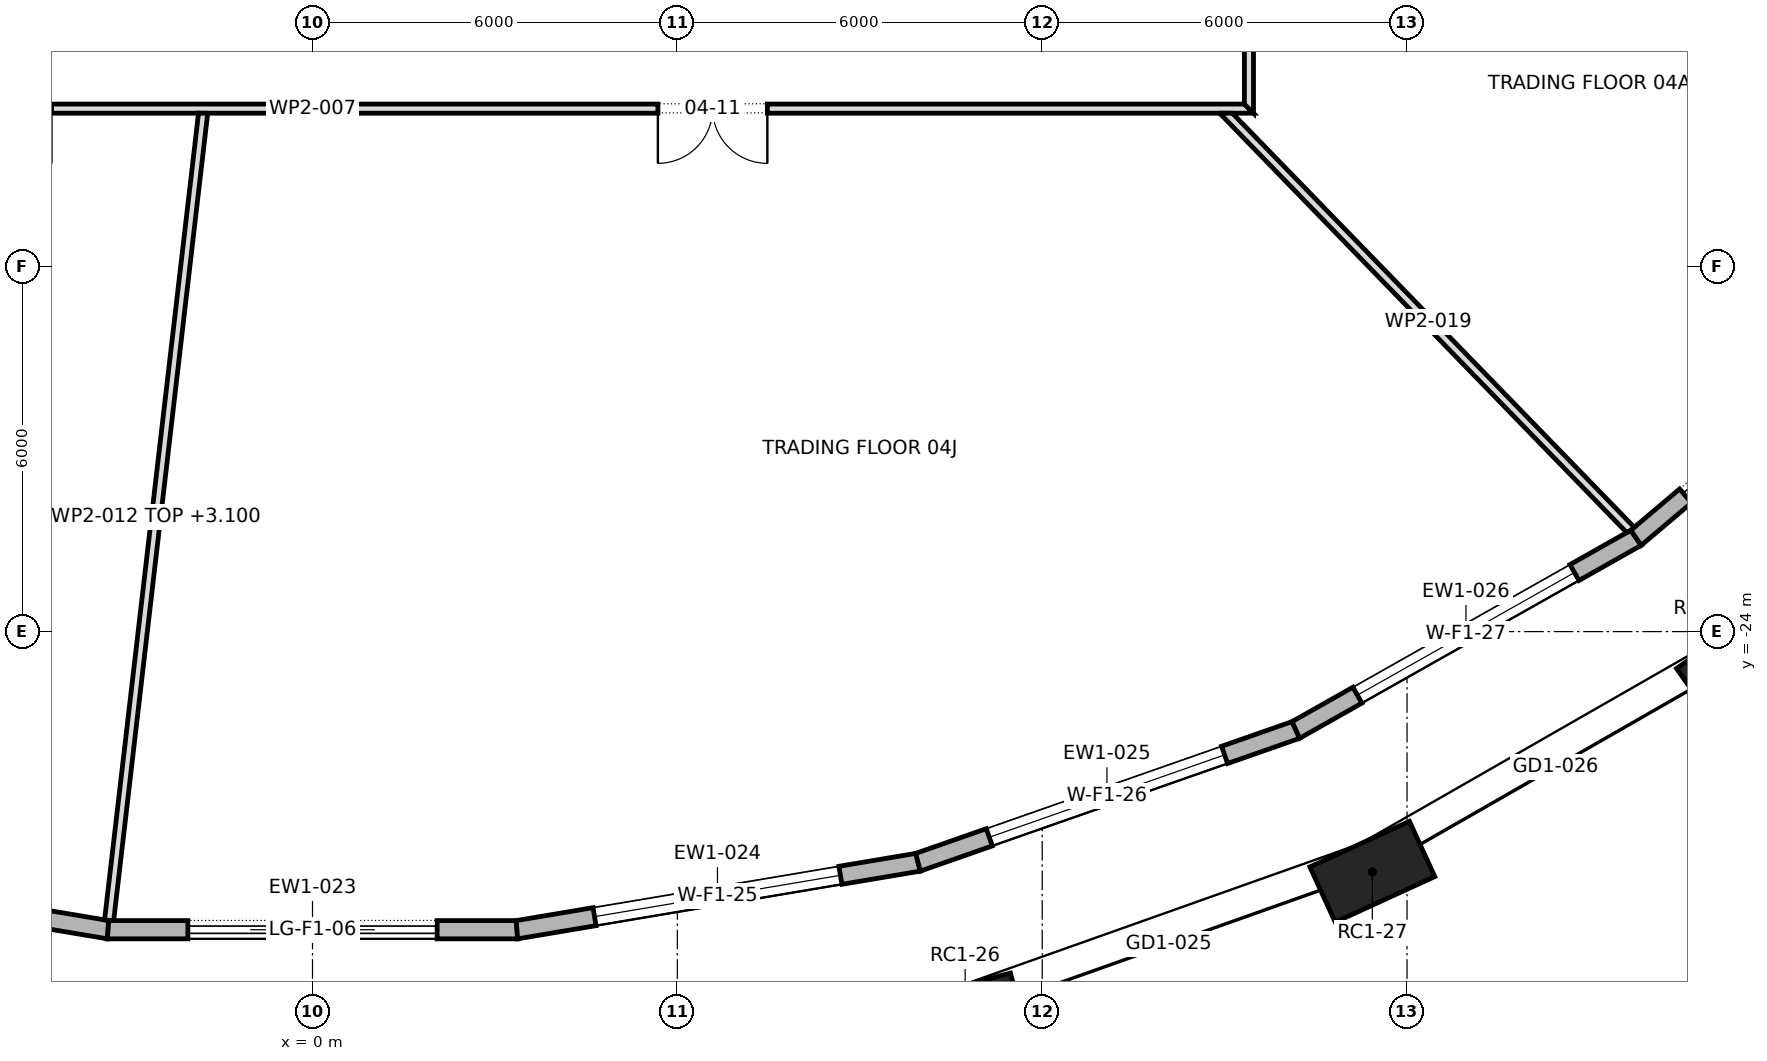
"""IFC4 building model, lengths in metres.
Left out: names, types, materials, properties, quantities, classifications, styles, units other than length and angle.
Written with IfcOpenShell. Run it as: python <this file> out.ifc"""

import sys

from ifc_helpers import new_model, si_unit, direction, frame, frame_2d, origin, origin_2d, place, context, subcontext, project, spatial, polyline, rectangle, outline, extrude, element, fill, save


model = new_model("IFC4")
c1 = context("Model", 3, precision=1e-05, world=origin(), true_north=direction((0.0, 1.0)))
c2 = subcontext(c1, "Body", "Model", "MODEL_VIEW")
j1 = project(units=[si_unit("LENGTHUNIT", "METRE"), si_unit("PLANEANGLEUNIT", "RADIAN")], contexts=[c1])
p1 = place(None, origin())
s1 = spatial("IfcSite", under=j1, at=p1, CompositionType="ELEMENT")
p2 = place(p1, origin())
s2 = spatial("IfcBuilding", under=s1, at=p2, CompositionType="ELEMENT")
p3 = place(p2, frame((0.0, 0.0, 61.3)))
s3 = spatial("IfcBuildingStorey", under=s2, at=p3, CompositionType="ELEMENT", Elevation=61.3)
for number, where, z_axis, x_axis in (
    (1, (10.733, -30.327, 0.0), (0.0, 0.0, 1.0), (0.968, 0.252, 0.0)),
    (2, (17.429, -27.95, 0.0), (0.0, 0.0, 1.0), (0.909, 0.417, 0.0)),
    (3, (23.456, -24.498, 0.0), (0.0, 0.0, 1.0), (0.818, 0.575, 0.0)),
):
    element("IfcColumn", number, at=place(p3, frame(where, z_axis=z_axis, x_axis=x_axis)), inside=s3, PredefinedType="COLUMN", context=c2, shape_type="SweptSolid", body=[
        extrude(rectangle(XDim=1.8, YDim=1.0, at=origin_2d()), origin(), (0.0, 0.0, 1.0), 4.2),
    ])
p4 = place(p3, frame((-9.958, -27.793, 0.0), z_axis=(0.0, 0.0, 1.0), x_axis=(0.986153133093, -0.165837263877, 0.0)))
e4 = element("IfcWall", 4, at=p4, inside=s3, PredefinedType="STANDARD", context=c2, shape_type="SweptSolid", body=[
    extrude(outline(polyline([(-0.013, -0.15), (6.7, -0.15), (6.676, 0.15), (0.013, 0.15), (-0.013, -0.15)])), origin(), (0.0, 0.0, 1.0), 3.9),
])
p5 = place(p4, frame((1.294, 0.0, 0.6)))
e5 = element("IfcOpeningElement", 5, at=p5, cuts=e4, PredefinedType="OPENING", context=c2, shape_type="SweptSolid", body=[
    extrude(rectangle(XDim=4.1, YDim=2.85, at=frame_2d((2.05, 1.425))), frame((0.0, 0.162, 0.0), z_axis=(0.0, -1.0, 0.0), x_axis=(1.0, 0.0, 0.0)), (0.0, 0.0, 1.0), 0.324),
])
p6 = place(p3, frame((-3.362, -28.903, 0.0), z_axis=(0.0, 0.0, 1.0), x_axis=(1.0, 0.0, 0.0)))
e6 = element("IfcWall", 6, at=p6, inside=s3, PredefinedType="STANDARD", context=c2, shape_type="SweptSolid", body=[
    extrude(outline(polyline([(-0.012, -0.15), (6.737, -0.15), (6.712, 0.15), (0.012, 0.15), (-0.012, -0.15)])), origin(), (0.0, 0.0, 1.0), 3.9),
])
p7 = place(p6, frame((1.312, 0.0, 0.0)))
e7 = element("IfcOpeningElement", 7, at=p7, cuts=e6, PredefinedType="OPENING", context=c2, shape_type="SweptSolid", body=[
    extrude(rectangle(XDim=4.1, YDim=3.45, at=frame_2d((2.05, 1.725))), frame((0.0, 0.162, 0.0), z_axis=(0.0, -1.0, 0.0), x_axis=(1.0, 0.0, 0.0)), (0.0, 0.0, 1.0), 0.324),
])
p8 = place(p3, frame((3.362, -28.903, 0.0), z_axis=(0.0, 0.0, 1.0), x_axis=(0.986153133093, 0.165837263877, 0.0)))
e8 = element("IfcWall", 8, at=p8, inside=s3, PredefinedType="STANDARD", context=c2, shape_type="SweptSolid", body=[
    extrude(outline(polyline([(-0.012, -0.15), (6.701, -0.15), (6.675, 0.15), (0.012, 0.15), (-0.012, -0.15)])), origin(), (0.0, 0.0, 1.0), 3.9),
])
p9 = place(p8, frame((1.294, 0.0, 0.6)))
e9 = element("IfcOpeningElement", 9, at=p9, cuts=e8, PredefinedType="OPENING", context=c2, shape_type="SweptSolid", body=[
    extrude(rectangle(XDim=4.1, YDim=2.85, at=frame_2d((2.05, 1.425))), frame((0.0, 0.162, 0.0), z_axis=(0.0, -1.0, 0.0), x_axis=(1.0, 0.0, 0.0)), (0.0, 0.0, 1.0), 0.324),
])
p10 = place(p3, frame((9.958, -27.793, 0.0), z_axis=(0.0, 0.0, 1.0), x_axis=(0.94380689486, 0.330497420889, 0.0)))
e10 = element("IfcWall", 10, at=p10, inside=s3, PredefinedType="STANDARD", context=c2, shape_type="SweptSolid", body=[
    extrude(outline(polyline([(-0.013, -0.15), (6.597, -0.15), (6.571, 0.15), (0.013, 0.15), (-0.013, -0.15)])), origin(), (0.0, 0.0, 1.0), 3.9),
])
p11 = place(p10, frame((1.242, 0.0, 0.6)))
e11 = element("IfcOpeningElement", 11, at=p11, cuts=e10, PredefinedType="OPENING", context=c2, shape_type="SweptSolid", body=[
    extrude(rectangle(XDim=4.1, YDim=2.85, at=frame_2d((2.05, 1.425))), frame((0.0, 0.162, 0.0), z_axis=(0.0, -1.0, 0.0), x_axis=(1.0, 0.0, 0.0)), (0.0, 0.0, 1.0), 0.324),
])
p12 = place(p3, frame((16.172, -25.617, 0.0), z_axis=(0.0, 0.0, 1.0), x_axis=(0.870673928577, 0.491860661262, 0.0)))
e12 = element("IfcWall", 12, at=p12, inside=s3, PredefinedType="STANDARD", context=c2, shape_type="SweptSolid", body=[
    extrude(outline(polyline([(-0.013, -0.15), (6.439, -0.15), (6.411, 0.15), (0.013, 0.15), (-0.013, -0.15)])), origin(), (0.0, 0.0, 1.0), 3.9),
])
p13 = place(p12, frame((1.163, 0.0, 0.6)))
e13 = element("IfcOpeningElement", 13, at=p13, cuts=e12, PredefinedType="OPENING", context=c2, shape_type="SweptSolid", body=[
    extrude(rectangle(XDim=4.1, YDim=2.85, at=frame_2d((2.05, 1.425))), frame((0.0, 0.162, 0.0), z_axis=(0.0, -1.0, 0.0), x_axis=(1.0, 0.0, 0.0)), (0.0, 0.0, 1.0), 0.324),
])
p14 = place(p3, frame((21.766, -22.457, 0.0), z_axis=(0.0, 0.0, 1.0), x_axis=(0.763655167989, 0.645624336905, 0.0)))
e14 = element("IfcWall", 14, at=p14, inside=s3, PredefinedType="STANDARD", context=c2, shape_type="SweptSolid", body=[
    extrude(outline(polyline([(-0.014, -0.15), (6.247, -0.15), (6.217, 0.15), (0.014, 0.15), (-0.014, -0.15)])), origin(), (0.0, 0.0, 1.0), 3.9),
])
p15 = place(p14, frame((1.066, 0.0, 0.0)))
e15 = element("IfcOpeningElement", 15, at=p15, cuts=e14, PredefinedType="OPENING", context=c2, shape_type="SweptSolid", body=[
    extrude(rectangle(XDim=4.1, YDim=3.45, at=frame_2d((2.05, 1.725))), frame((0.0, 0.162, 0.0), z_axis=(0.0, -1.0, 0.0), x_axis=(1.0, 0.0, 0.0)), (0.0, 0.0, 1.0), 0.324),
])
p16 = place(p3, frame((-15.475, -15.4, 0.0), z_axis=(0.0, 0.0, 1.0), x_axis=(1.0, 0.0, 0.0)))
e16 = element("IfcWall", 16, at=p16, inside=s3, PredefinedType="PARTITIONING", context=c2, shape_type="SweptSolid", body=[
    extrude(outline(polyline([(0.0, -0.075), (1.935, -0.075), (3.869, -0.075), (5.803, -0.075), (7.738, -0.075), (9.672, -0.075), (11.606, -0.075), (13.541, -0.075), (15.475, -0.075), (17.409, -0.075), (19.344, -0.075), (21.278, -0.075), (23.212, -0.075), (25.147, -0.075), (27.081, -0.075), (29.016, -0.075), (30.95, -0.075), (30.8, 0.075), (28.885, 0.075), (26.969, 0.075), (25.053, 0.075), (23.138, 0.075), (21.222, 0.075), (19.306, 0.075), (17.391, 0.075), (15.475, 0.075), (13.56, 0.075), (11.644, 0.075), (9.728, 0.075), (7.812, 0.075), (5.897, 0.075), (3.981, 0.075), (2.066, 0.075), (0.15, 0.075), (0.0, -0.075)])), origin(), (0.0, 0.0, 1.0), 3.9),
])
p17 = place(p16, frame((2.577, 0.0, 0.0)))
e17 = element("IfcOpeningElement", 17, at=p17, cuts=e16, PredefinedType="OPENING", context=c2, shape_type="SweptSolid", body=[
    extrude(rectangle(XDim=1.8, YDim=2.1, at=frame_2d((0.9, 1.05))), frame((0.0, 0.087, 0.0), z_axis=(0.0, -1.0, 0.0), x_axis=(1.0, 0.0, 0.0)), (0.0, 0.0, 1.0), 0.174),
])
p18 = place(p16, frame((9.383, 0.0, 0.0)))
e18 = element("IfcOpeningElement", 18, at=p18, cuts=e16, PredefinedType="OPENING", context=c2, shape_type="SweptSolid", body=[
    extrude(rectangle(XDim=1.8, YDim=2.1, at=frame_2d((0.9, 1.05))), frame((0.0, 0.087, 0.0), z_axis=(0.0, -1.0, 0.0), x_axis=(1.0, 0.0, 0.0)), (0.0, 0.0, 1.0), 0.174),
])
p19 = place(p16, frame((21.155, 0.0, 0.0)))
e19 = element("IfcOpeningElement", 19, at=p19, cuts=e16, PredefinedType="OPENING", context=c2, shape_type="SweptSolid", body=[
    extrude(rectangle(XDim=1.8, YDim=2.1, at=frame_2d((0.9, 1.05))), frame((0.0, 0.087, 0.0), z_axis=(0.0, -1.0, 0.0), x_axis=(1.0, 0.0, 0.0)), (0.0, 0.0, 1.0), 0.174),
])
p20 = place(p3, frame((-1.798, -15.467, 0.0), z_axis=(0.0, 0.0, 1.0), x_axis=(-0.115696073872, -0.993284661359, 0.0)))
e20 = element("IfcWall", 20, at=p20, inside=s3, PredefinedType="PARTITIONING", context=c2, shape_type="SweptSolid", body=[
    extrude(outline(polyline([(13.372, -0.075), (13.372, 0.031), (13.367, 0.075), (11.458, 0.075), (9.548, 0.075), (7.638, 0.075), (5.729, 0.075), (3.819, 0.075), (1.91, 0.075), (0.0, 0.075), (0.0, 0.073), (0.017, -0.075), (1.925, -0.075), (3.833, -0.075), (5.741, -0.075), (7.649, -0.075), (9.557, -0.075), (11.464, -0.075), (13.372, -0.075)])), origin(), (0.0, 0.0, 1.0), 3.1),
])
p21 = place(p3, frame((15.4, -15.475, 0.0), z_axis=(0.0, 0.0, 1.0), x_axis=(0.0, 1.0, 0.0)))
e21 = element("IfcWall", 21, at=p21, inside=s3, PredefinedType="PARTITIONING", context=c2, shape_type="SweptSolid", body=[
    extrude(outline(polyline([(0.0, -0.075), (1.935, -0.075), (3.869, -0.075), (5.803, -0.075), (7.738, -0.075), (9.672, -0.075), (11.606, -0.075), (13.541, -0.075), (15.475, -0.075), (17.409, -0.075), (19.344, -0.075), (21.278, -0.075), (23.212, -0.075), (25.147, -0.075), (27.081, -0.075), (29.016, -0.075), (30.95, -0.075), (30.8, 0.075), (28.885, 0.075), (26.969, 0.075), (25.053, 0.075), (23.138, 0.075), (21.222, 0.075), (19.306, 0.075), (17.391, 0.075), (15.475, 0.075), (13.56, 0.075), (11.644, 0.075), (9.728, 0.075), (7.812, 0.075), (5.897, 0.075), (3.981, 0.075), (2.066, 0.075), (0.15, 0.075), (0.0, -0.075)])), origin(), (0.0, 0.0, 1.0), 3.9),
])
p22 = place(p21, frame((4.9, 0.0, 0.0)))
e22 = element("IfcOpeningElement", 22, at=p22, cuts=e21, PredefinedType="OPENING", context=c2, shape_type="SweptSolid", body=[
    extrude(rectangle(XDim=1.8, YDim=2.1, at=frame_2d((0.9, 1.05))), frame((0.0, 0.087, 0.0), z_axis=(0.0, -1.0, 0.0), x_axis=(1.0, 0.0, 0.0)), (0.0, 0.0, 1.0), 0.174),
])
p23 = place(p21, frame((14.975, 0.0, 0.0)))
e23 = element("IfcOpeningElement", 23, at=p23, cuts=e21, PredefinedType="OPENING", context=c2, shape_type="SweptSolid", body=[
    extrude(rectangle(XDim=1.0, YDim=2.1, at=frame_2d((0.5, 1.05))), frame((0.0, 0.087, 0.0), z_axis=(0.0, -1.0, 0.0), x_axis=(1.0, 0.0, 0.0)), (0.0, 0.0, 1.0), 0.174),
])
p24 = place(p21, frame((24.25, 0.0, 0.0)))
e24 = element("IfcOpeningElement", 24, at=p24, cuts=e21, PredefinedType="OPENING", context=c2, shape_type="SweptSolid", body=[
    extrude(rectangle(XDim=1.8, YDim=2.1, at=frame_2d((0.9, 1.05))), frame((0.0, 0.087, 0.0), z_axis=(0.0, -1.0, 0.0), x_axis=(1.0, 0.0, 0.0)), (0.0, 0.0, 1.0), 0.174),
])
p25 = place(p3, frame((21.683, -22.337, 0.0), z_axis=(0.0, 0.0, 1.0), x_axis=(-0.696500320059, 0.71755648151, 0.0)))
e25 = element("IfcWall", 25, at=p25, inside=s3, PredefinedType="PARTITIONING", context=c2, shape_type="SweptSolid", body=[
    extrude(outline(polyline([(0.0, -0.075), (1.898, -0.075), (3.796, -0.075), (5.694, -0.075), (7.592, -0.075), (9.49, -0.075), (9.635, 0.074), (9.635, 0.075), (7.713, 0.075), (5.791, 0.075), (3.869, 0.075), (1.947, 0.075), (0.024, 0.075), (0.005, 0.0), (0.0, -0.072), (0.0, -0.075)])), origin(), (0.0, 0.0, 1.0), 3.9),
])
p26 = place(p7, origin())
e26 = element("IfcDoor", 26, at=p26, inside=s3, OperationType="DOUBLE_DOOR_SLIDING", PredefinedType="DOOR", context=c2, shape_type="SweptSolid", body=[
    extrude(rectangle(XDim=4.1, YDim=3.45, at=frame_2d((2.05, 1.725))), frame((0.0, 0.025, 0.0), z_axis=(0.0, -1.0, 0.0), x_axis=(1.0, 0.0, 0.0)), (0.0, 0.0, 1.0), 0.05),
])
fill(e7, e26)
p27 = place(p9, origin())
e27 = element("IfcWindow", 27, at=p27, inside=s3, PartitioningType="TRIPLE_PANEL_VERTICAL", PredefinedType="WINDOW", context=c2, shape_type="SweptSolid", body=[
    extrude(rectangle(XDim=4.1, YDim=2.85, at=frame_2d((2.05, 1.425))), frame((0.0, 0.03, 0.0), z_axis=(0.0, -1.0, 0.0), x_axis=(1.0, 0.0, 0.0)), (0.0, 0.0, 1.0), 0.06),
])
fill(e9, e27)
p28 = place(p11, origin())
e28 = element("IfcWindow", 28, at=p28, inside=s3, PartitioningType="TRIPLE_PANEL_VERTICAL", PredefinedType="WINDOW", context=c2, shape_type="SweptSolid", body=[
    extrude(rectangle(XDim=4.1, YDim=2.85, at=frame_2d((2.05, 1.425))), frame((0.0, 0.03, 0.0), z_axis=(0.0, -1.0, 0.0), x_axis=(1.0, 0.0, 0.0)), (0.0, 0.0, 1.0), 0.06),
])
fill(e11, e28)
p29 = place(p13, origin())
e29 = element("IfcWindow", 29, at=p29, inside=s3, PartitioningType="TRIPLE_PANEL_VERTICAL", PredefinedType="WINDOW", context=c2, shape_type="SweptSolid", body=[
    extrude(rectangle(XDim=4.1, YDim=2.85, at=frame_2d((2.05, 1.425))), frame((0.0, 0.03, 0.0), z_axis=(0.0, -1.0, 0.0), x_axis=(1.0, 0.0, 0.0)), (0.0, 0.0, 1.0), 0.06),
])
fill(e13, e29)
p30 = place(p15, origin())
e30 = element("IfcDoor", 30, at=p30, inside=s3, OperationType="DOUBLE_DOOR_SLIDING", PredefinedType="DOOR", context=c2, shape_type="SweptSolid", body=[
    extrude(rectangle(XDim=4.1, YDim=3.45, at=frame_2d((2.05, 1.725))), frame((0.0, 0.025, 0.0), z_axis=(0.0, -1.0, 0.0), x_axis=(1.0, 0.0, 0.0)), (0.0, 0.0, 1.0), 0.05),
])
fill(e15, e30)
p31 = place(p19, frame((1.8, 0.0, 0.0), z_axis=(0.0, 0.0, 1.0), x_axis=(-1.0, 0.0, 0.0)))
e31 = element("IfcDoor", 31, at=p31, inside=s3, OperationType="DOUBLE_DOOR_SINGLE_SWING", PredefinedType="DOOR", context=c2, shape_type="SweptSolid", body=[
    extrude(rectangle(XDim=1.8, YDim=2.1, at=frame_2d((0.9, 1.05))), frame((0.0, 0.025, 0.0), z_axis=(0.0, -1.0, 0.0), x_axis=(1.0, 0.0, 0.0)), (0.0, 0.0, 1.0), 0.05),
])
fill(e19, e31)
save(model, sys.argv[1])
